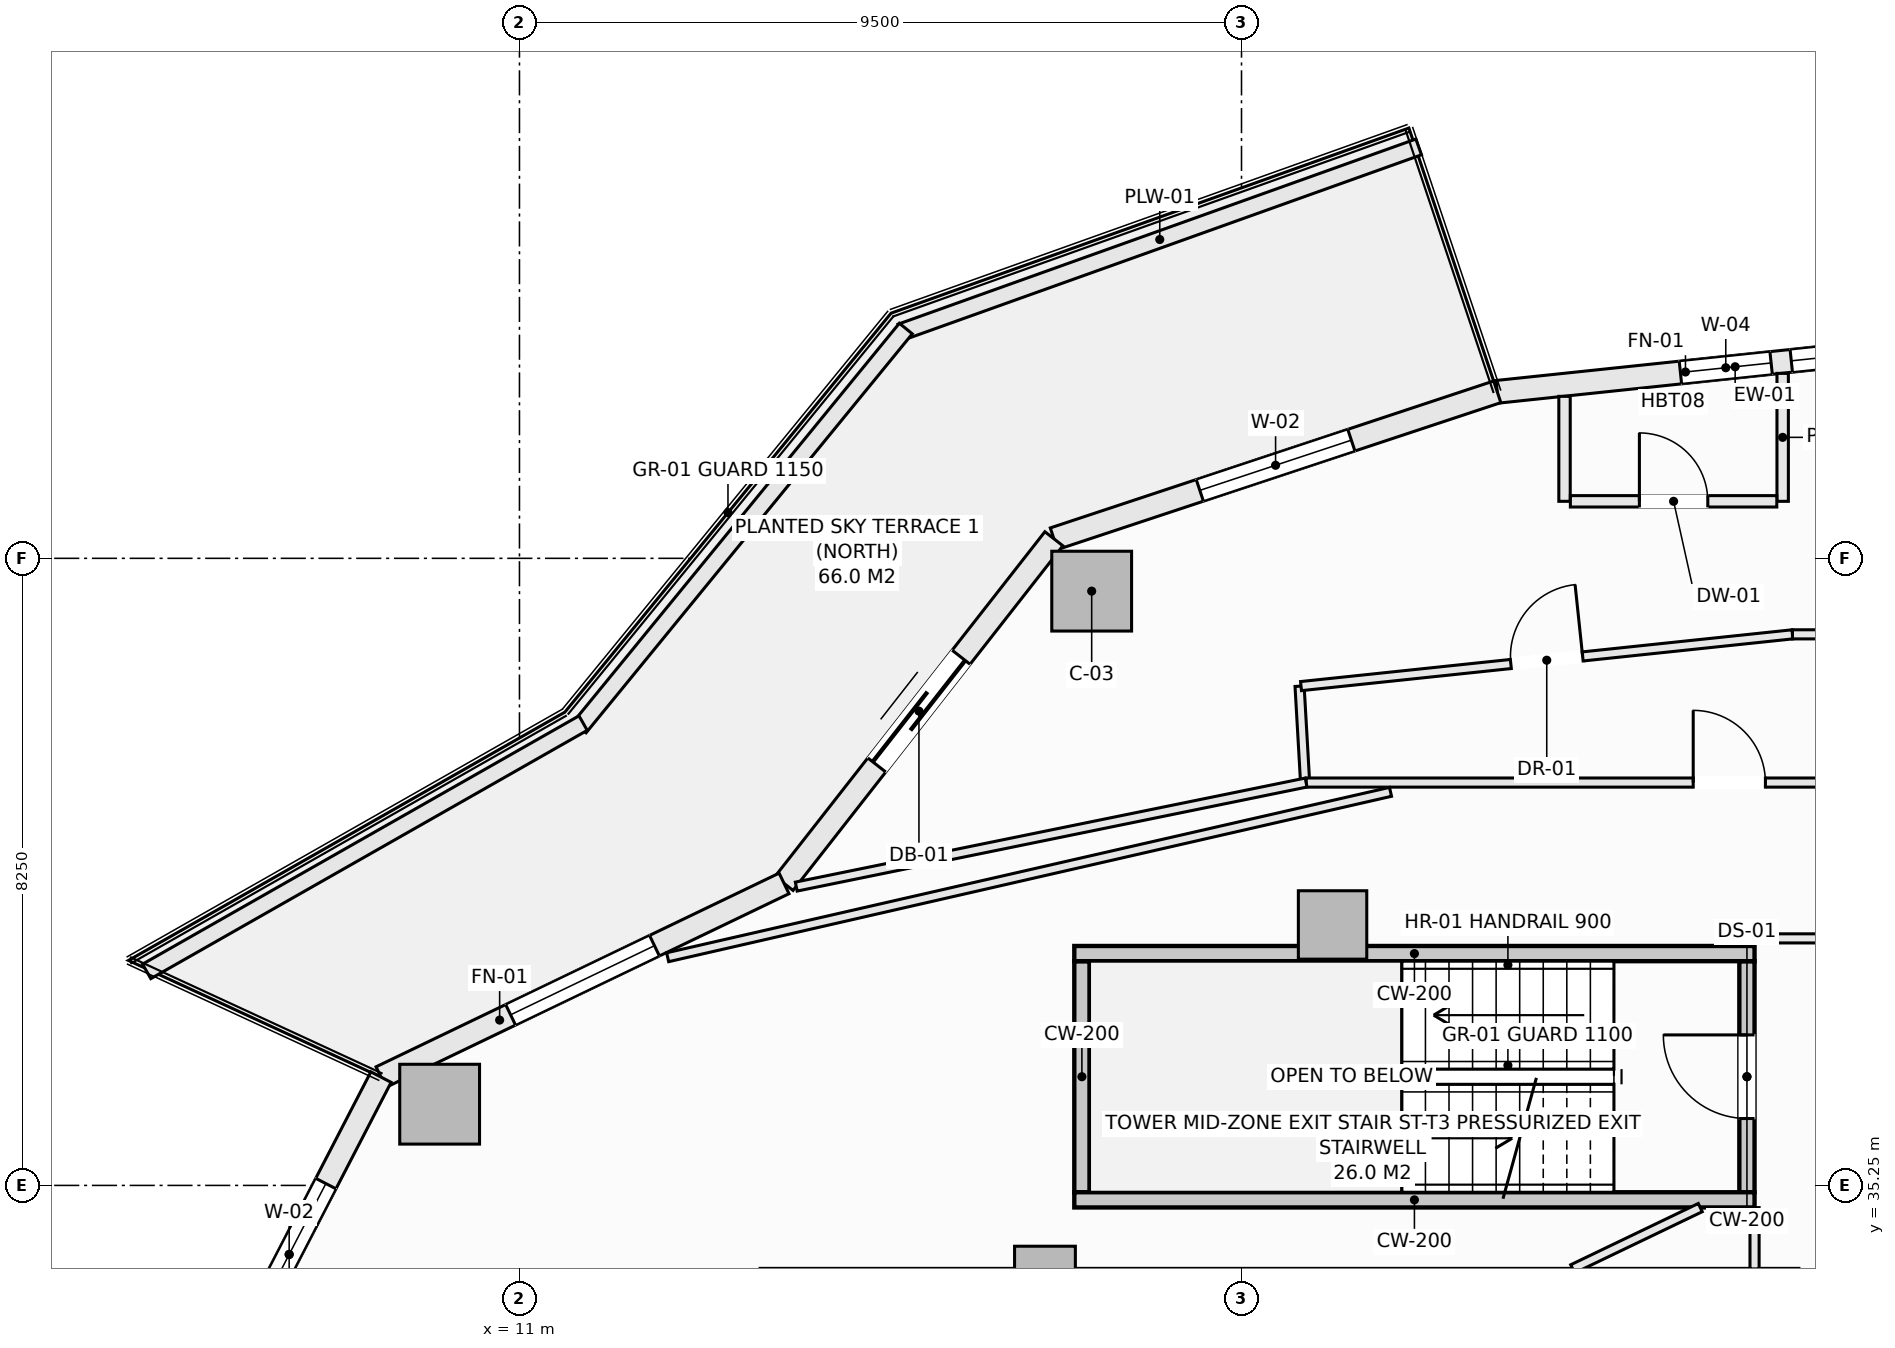
"""IFC4 building model, lengths in metres.
Left out: names, types, materials, properties, quantities, classifications, styles, units other than length and angle.
Written with IfcOpenShell. Run it as: python <this file> out.ifc"""

import sys

from ifc_helpers import new_model, si_unit, direction, frame, frame_2d, origin, origin_2d, place, context, subcontext, project, spatial, rectangle, extrude, element, fill, save


model = new_model("IFC4")
c1 = context("Model", 3, precision=1e-05, world=origin(), true_north=direction((0.0, 1.0)))
c2 = subcontext(c1, "Body", "Model", "MODEL_VIEW")
j1 = project(units=[si_unit("LENGTHUNIT", "METRE"), si_unit("PLANEANGLEUNIT", "RADIAN")], contexts=[c1])
p1 = place(None, origin())
s1 = spatial("IfcSite", under=j1, at=p1, CompositionType="ELEMENT")
p2 = place(p1, origin())
s2 = spatial("IfcBuilding", under=s1, at=p2, CompositionType="ELEMENT")
p3 = place(p2, frame((0.0, 0.0, 122.3)))
s3 = spatial("IfcBuildingStorey", under=s2, at=p3, CompositionType="ELEMENT", Elevation=122.3)
for number, where, z_axis, x_axis in (
    (1, (18.529, 43.068, -0.27), (0.0, 0.0, 1.0), (1.0, 0.0, 0.0)),
    (2, (9.95, 36.319, -0.27), (0.0, 0.0, 1.0), (1.0, 0.0, 0.0)),
):
    element("IfcColumn", number, at=place(p3, frame(where, z_axis=z_axis, x_axis=x_axis)), inside=s3, PredefinedType="COLUMN", context=c2, shape_type="SweptSolid", body=[
        extrude(rectangle(XDim=1.05, YDim=1.05, at=origin_2d()), origin(), (0.0, 0.0, 1.0), 3.4),
    ])
p4 = place(p3, frame((21.698, 38.677, -0.27), z_axis=(0.0, 0.0, 1.0), x_axis=(1.0, 0.0, 0.0)))
e3 = element("IfcColumn", 3, at=p4, inside=s3, PredefinedType="COLUMN", context=c2, shape_type="SweptSolid", body=[
    extrude(rectangle(XDim=0.9, YDim=0.9, at=origin_2d()), origin(), (0.0, 0.0, 1.0), 3.4),
])
p5 = place(p3, frame((17.914, 34.05, -0.27), z_axis=(0.0, 0.0, 1.0), x_axis=(1.0, 0.0, 0.0)))
e4 = element("IfcColumn", 4, at=p5, inside=s3, PredefinedType="PILASTER", context=c2, shape_type="SweptSolid", body=[
    extrude(rectangle(XDim=0.8, YDim=0.8, at=origin_2d()), origin(), (0.0, 0.0, 1.0), 3.4),
])
p6 = place(p3, frame((23.865, 45.691, 0.0), z_axis=(0.0, 0.0, 1.0), x_axis=(0.994498012394, 0.104755445421, 0.0)))
e5 = element("IfcWall", 5, at=p6, inside=s3, PredefinedType="SOLIDWALL", context=c2, shape_type="SweptSolid", body=[
    extrude(rectangle(XDim=6.295, YDim=0.3, at=frame_2d((3.147, 0.0))), origin(), (0.0, 0.0, 1.0), 2.653),
])
p7 = place(p6, frame((2.423, 0.0, 0.74)))
e6 = element("IfcOpeningElement", 6, at=p7, cuts=e5, PredefinedType="OPENING", context=c2, shape_type="SweptSolid", body=[
    extrude(rectangle(XDim=1.2, YDim=1.7, at=frame_2d((0.6, 0.85))), frame((0.0, 0.16, 0.0), z_axis=(0.0, -1.0, 0.0), x_axis=(1.0, 0.0, 0.0)), (0.0, 0.0, 1.0), 0.32),
])
p8 = place(p6, frame((3.89, 0.0, 0.74)))
e7 = element("IfcOpeningElement", 7, at=p8, cuts=e5, PredefinedType="OPENING", context=c2, shape_type="SweptSolid", body=[
    extrude(rectangle(XDim=1.2, YDim=1.7, at=frame_2d((0.6, 0.85))), frame((0.0, 0.16, 0.0), z_axis=(0.0, -1.0, 0.0), x_axis=(1.0, 0.0, 0.0)), (0.0, 0.0, 1.0), 0.32),
])
p9 = place(p3, frame((18.031, 43.758, 0.0), z_axis=(0.0, 0.0, 1.0), x_axis=(0.949238009374, 0.314558741032, 0.0)))
e8 = element("IfcWall", 8, at=p9, inside=s3, PredefinedType="SOLIDWALL", context=c2, shape_type="SweptSolid", body=[
    extrude(rectangle(XDim=6.146, YDim=0.3, at=frame_2d((3.073, 0.0))), origin(), (0.0, 0.0, 1.0), 2.653),
])
p10 = place(p9, frame((2.023, 0.0, 0.74)))
e9 = element("IfcOpeningElement", 9, at=p10, cuts=e8, PredefinedType="OPENING", context=c2, shape_type="SweptSolid", body=[
    extrude(rectangle(XDim=2.1, YDim=1.7, at=frame_2d((1.05, 0.85))), frame((0.0, 0.16, 0.0), z_axis=(0.0, -1.0, 0.0), x_axis=(1.0, 0.0, 0.0)), (0.0, 0.0, 1.0), 0.32),
])
p11 = place(p3, frame((14.481, 39.223, 0.0), z_axis=(0.0, 0.0, 1.0), x_axis=(0.616435134162, 0.787405693001, 0.0)))
e10 = element("IfcWall", 10, at=p11, inside=s3, PredefinedType="SOLIDWALL", context=c2, shape_type="SweptSolid", body=[
    extrude(rectangle(XDim=5.759, YDim=0.3, at=frame_2d((2.879, 0.0))), origin(), (0.0, 0.0, 1.0), 2.653),
])
p12 = place(p11, frame((1.979, 0.0, 0.0)))
e11 = element("IfcOpeningElement", 11, at=p12, cuts=e10, PredefinedType="OPENING", context=c2, shape_type="SweptSolid", body=[
    extrude(rectangle(XDim=1.8, YDim=2.25, at=frame_2d((0.9, 1.125))), frame((0.0, 0.16, 0.0), z_axis=(0.0, -1.0, 0.0), x_axis=(1.0, 0.0, 0.0)), (0.0, 0.0, 1.0), 0.32),
])
p13 = place(p3, frame((9.178, 36.675, 0.0), z_axis=(0.0, 0.0, 1.0), x_axis=(0.901370184739, 0.433049408339, 0.0)))
e12 = element("IfcWall", 12, at=p13, inside=s3, PredefinedType="SOLIDWALL", context=c2, shape_type="SweptSolid", body=[
    extrude(rectangle(XDim=5.884, YDim=0.3, at=frame_2d((2.942, 0.0))), origin(), (0.0, 0.0, 1.0), 2.653),
])
p14 = place(p13, frame((1.892, 0.0, 0.74)))
e13 = element("IfcOpeningElement", 13, at=p14, cuts=e12, PredefinedType="OPENING", context=c2, shape_type="SweptSolid", body=[
    extrude(rectangle(XDim=2.1, YDim=1.7, at=frame_2d((1.05, 0.85))), frame((0.0, 0.16, 0.0), z_axis=(0.0, -1.0, 0.0), x_axis=(1.0, 0.0, 0.0)), (0.0, 0.0, 1.0), 0.32),
])
p15 = place(p3, frame((6.762, 32.008, 0.0), z_axis=(0.0, 0.0, 1.0), x_axis=(0.459767899643, 0.888039119892, 0.0)))
e14 = element("IfcWall", 14, at=p15, inside=s3, PredefinedType="SOLIDWALL", context=c2, shape_type="SweptSolid", body=[
    extrude(rectangle(XDim=5.255, YDim=0.3, at=frame_2d((2.628, 0.0))), origin(), (0.0, 0.0, 1.0), 2.653),
])
p16 = place(p15, frame((1.578, 0.0, 0.74)))
e15 = element("IfcOpeningElement", 15, at=p16, cuts=e14, PredefinedType="OPENING", context=c2, shape_type="SweptSolid", body=[
    extrude(rectangle(XDim=2.1, YDim=1.7, at=frame_2d((1.05, 0.85))), frame((0.0, 0.16, 0.0), z_axis=(0.0, -1.0, 0.0), x_axis=(1.0, 0.0, 0.0)), (0.0, 0.0, 1.0), 0.32),
])
p17 = place(p3, frame((16.018, 46.477, 0.0), z_axis=(0.0, 0.0, 1.0), x_axis=(0.941628873241, 0.336652736627, 0.0)))
e16 = element("IfcWall", 16, at=p17, inside=s3, PredefinedType="PARAPET", context=c2, shape_type="SweptSolid", body=[
    extrude(rectangle(XDim=7.235, YDim=0.22, at=frame_2d((3.618, 0.0))), origin(), (0.0, 0.0, 1.0), 0.52),
])
p18 = place(p3, frame((11.791, 41.274, 0.0), z_axis=(0.0, 0.0, 1.0), x_axis=(0.633024046468, 0.774132131224, 0.0)))
e17 = element("IfcWall", 17, at=p18, inside=s3, PredefinedType="PARAPET", context=c2, shape_type="SweptSolid", body=[
    extrude(rectangle(XDim=6.781, YDim=0.22, at=frame_2d((3.39, 0.0))), origin(), (0.0, 0.0, 1.0), 0.52),
])
p19 = place(p3, frame((6.095, 38.066, 0.0), z_axis=(0.0, 0.0, 1.0), x_axis=(0.869187658335, 0.494482370361, 0.0)))
e18 = element("IfcWall", 18, at=p19, inside=s3, PredefinedType="PARAPET", context=c2, shape_type="SweptSolid", body=[
    extrude(rectangle(XDim=6.606, YDim=0.22, at=frame_2d((3.303, 0.0))), origin(), (0.0, 0.0, 1.0), 0.52),
])
p20 = place(p3, frame((27.15, 35.16, -0.27), z_axis=(0.0, 0.0, 1.0), x_axis=(0.0, 1.0, 0.0)))
e19 = element("IfcWall", 19, at=p20, inside=s3, PredefinedType="SHEAR", context=c2, shape_type="SweptSolid", body=[
    extrude(rectangle(XDim=3.04, YDim=0.2, at=frame_2d((1.52, 0.0))), origin(), (0.0, 0.0, 1.0), 3.4),
])
p21 = place(p20, frame((0.97, 0.0, 0.27)))
e20 = element("IfcOpeningElement", 20, at=p21, cuts=e19, PredefinedType="OPENING", context=c2, shape_type="SweptSolid", body=[
    extrude(rectangle(XDim=1.1, YDim=2.15, at=frame_2d((0.55, 1.075))), frame((0.0, 0.11, 0.0), z_axis=(0.0, -1.0, 0.0), x_axis=(1.0, 0.0, 0.0)), (0.0, 0.0, 1.0), 0.22),
])
p22 = place(p3, frame((18.4, 35.16, -0.27), z_axis=(0.0, 0.0, 1.0), x_axis=(0.0, 1.0, 0.0)))
e21 = element("IfcWall", 21, at=p22, inside=s3, PredefinedType="SHEAR", context=c2, shape_type="SweptSolid", body=[
    extrude(rectangle(XDim=3.04, YDim=0.2, at=frame_2d((1.52, 0.0))), origin(), (0.0, 0.0, 1.0), 3.4),
])
for number, where, z_axis, x_axis in (
    (22, (18.3, 38.3, -0.27), (0.0, 0.0, 1.0), (1.0, 0.0, 0.0)),
    (23, (18.3, 35.06, -0.27), (0.0, 0.0, 1.0), (1.0, 0.0, 0.0)),
):
    element("IfcWall", number, at=place(p3, frame(where, z_axis=z_axis, x_axis=x_axis)), inside=s3, PredefinedType="SHEAR", context=c2, shape_type="SweptSolid", body=[
        extrude(rectangle(XDim=8.95, YDim=0.2, at=frame_2d((4.475, 0.0))), origin(), (0.0, 0.0, 1.0), 3.4),
    ])
p23 = place(p3, frame((27.62, 44.25, 0.0), z_axis=(0.0, 0.0, 1.0), x_axis=(0.0, 1.0, 0.0)))
e24 = element("IfcWall", 24, at=p23, inside=s3, PredefinedType="PARTITIONING", context=c2, shape_type="SweptSolid", body=[
    extrude(rectangle(XDim=1.683, YDim=0.15, at=frame_2d((0.842, 0.0))), origin(), (0.0, 0.0, 1.0), 3.13),
])
p24 = place(p3, frame((21.264, 41.818, 0.0), z_axis=(0.0, 0.0, 1.0), x_axis=(0.0574492264, -0.99834842935, 0.0)))
e25 = element("IfcWall", 25, at=p24, inside=s3, PredefinedType="PARTITIONING", context=c2, shape_type="SweptSolid", body=[
    extrude(rectangle(XDim=1.271, YDim=0.12, at=frame_2d((0.635, 0.0))), origin(), (0.0, 0.0, 1.0), 3.13),
])
p25 = place(p3, frame((27.25, 34.152, 0.0), z_axis=(0.0, 0.0, 1.0), x_axis=(0.0, 1.0, 0.0)))
e26 = element("IfcWall", 26, at=p25, inside=s3, PredefinedType="PARTITIONING", context=c2, shape_type="SweptSolid", body=[
    extrude(rectangle(XDim=0.806, YDim=0.12, at=frame_2d((0.403, 0.0))), origin(), (0.0, 0.0, 1.0), 3.13),
])
p26 = place(p3, frame((27.25, 38.5, 0.0), z_axis=(0.0, 0.0, 1.0), x_axis=(1.0, 0.0, 0.0)))
e27 = element("IfcWall", 27, at=p26, inside=s3, PredefinedType="PARTITIONING", context=c2, shape_type="SweptSolid", body=[
    extrude(rectangle(XDim=2.53, YDim=0.12, at=frame_2d((1.265, 0.0))), origin(), (0.0, 0.0, 1.0), 3.13),
])
p27 = place(p3, frame((21.351, 40.55, 0.0), z_axis=(0.0, 0.0, 1.0), x_axis=(1.0, 0.0, 0.0)))
e28 = element("IfcWall", 28, at=p27, inside=s3, PredefinedType="PARTITIONING", context=c2, shape_type="SweptSolid", body=[
    extrude(rectangle(XDim=10.737, YDim=0.12, at=frame_2d((5.369, 0.0))), origin(), (0.0, 0.0, 1.0), 3.13),
])
p28 = place(p27, frame((5.092, 0.0, 0.0)))
e29 = element("IfcOpeningElement", 29, at=p28, cuts=e28, PredefinedType="OPENING", context=c2, shape_type="SweptSolid", body=[
    extrude(rectangle(XDim=0.95, YDim=2.1, at=frame_2d((0.475, 1.05))), frame((0.0, 0.07, 0.0), z_axis=(0.0, -1.0, 0.0), x_axis=(1.0, 0.0, 0.0)), (0.0, 0.0, 1.0), 0.14),
])
p29 = place(p3, frame((21.283, 41.819, 0.0), z_axis=(0.0, 0.0, 1.0), x_axis=(0.994501131299, 0.104725831799, 0.0)))
e30 = element("IfcWall", 30, at=p29, inside=s3, PredefinedType="PARTITIONING", context=c2, shape_type="SweptSolid", body=[
    extrude(rectangle(XDim=6.502, YDim=0.12, at=frame_2d((3.251, 0.0))), origin(), (0.0, 0.0, 1.0), 3.13),
])
p30 = place(p29, frame((2.776, 0.0, 0.0)))
e31 = element("IfcOpeningElement", 31, at=p30, cuts=e30, PredefinedType="OPENING", context=c2, shape_type="SweptSolid", body=[
    extrude(rectangle(XDim=0.95, YDim=2.1, at=frame_2d((0.475, 1.05))), frame((0.0, 0.07, 0.0), z_axis=(0.0, -1.0, 0.0), x_axis=(1.0, 0.0, 0.0)), (0.0, 0.0, 1.0), 0.14),
])
p31 = place(p3, frame((27.749, 42.5, 0.0), z_axis=(0.0, 0.0, 1.0), x_axis=(1.0, 0.0, 0.0)))
e32 = element("IfcWall", 32, at=p31, inside=s3, PredefinedType="PARTITIONING", context=c2, shape_type="SweptSolid", body=[
    extrude(rectangle(XDim=4.752, YDim=0.12, at=frame_2d((2.376, 0.0))), origin(), (0.0, 0.0, 1.0), 3.13),
])
p32 = place(p3, frame((24.857, 34.152, 0.0), z_axis=(0.0, 0.0, 1.0), x_axis=(0.901471897781, 0.43283763412, 0.0)))
e33 = element("IfcWall", 33, at=p32, inside=s3, PredefinedType="PARTITIONING", context=c2, shape_type="SweptSolid", body=[
    extrude(rectangle(XDim=1.862, YDim=0.12, at=frame_2d((0.931, 0.0))), origin(), (0.0, 0.0, 1.0), 3.13),
])
p33 = place(p3, frame((24.75, 44.25, 0.0), z_axis=(0.0, 0.0, 1.0), x_axis=(0.0, 1.0, 0.0)))
e34 = element("IfcWall", 34, at=p33, inside=s3, PredefinedType="PARTITIONING", context=c2, shape_type="SweptSolid", body=[
    extrude(rectangle(XDim=1.381, YDim=0.15, at=frame_2d((0.69, 0.0))), origin(), (0.0, 0.0, 1.0), 3.13),
])
p34 = place(p3, frame((24.827, 44.25, 0.0), z_axis=(0.0, 0.0, 1.0), x_axis=(1.0, 0.0, 0.0)))
e35 = element("IfcWall", 35, at=p34, inside=s3, PredefinedType="PARTITIONING", context=c2, shape_type="SweptSolid", body=[
    extrude(rectangle(XDim=2.716, YDim=0.15, at=frame_2d((1.358, 0.0))), origin(), (0.0, 0.0, 1.0), 2.653),
])
p35 = place(p34, frame((0.908, 0.0, 0.0)))
e36 = element("IfcOpeningElement", 36, at=p35, cuts=e35, PredefinedType="OPENING", context=c2, shape_type="SweptSolid", body=[
    extrude(rectangle(XDim=0.9, YDim=2.1, at=frame_2d((0.45, 1.05))), frame((0.0, 0.085, 0.0), z_axis=(0.0, -1.0, 0.0), x_axis=(1.0, 0.0, 0.0)), (0.0, 0.0, 1.0), 0.17),
])
p36 = place(p3, frame((12.95, 38.252, 0.0), z_axis=(0.0, 0.0, 1.0), x_axis=(0.974810805883, 0.223033389281, 0.0)))
e37 = element("IfcWall", 37, at=p36, inside=s3, PredefinedType="PARTITIONING", context=c2, shape_type="SweptSolid", body=[
    extrude(rectangle(XDim=9.757, YDim=0.12, at=frame_2d((4.878, 0.0))), origin(), (0.0, 0.0, 1.0), 3.13),
])
p37 = place(p3, frame((14.642, 39.181, 0.0), z_axis=(0.0, 0.0, 1.0), x_axis=(0.979813468357, 0.199913899534, 0.0)))
e38 = element("IfcWall", 38, at=p37, inside=s3, PredefinedType="PARTITIONING", context=c2, shape_type="SweptSolid", body=[
    extrude(rectangle(XDim=6.846, YDim=0.12, at=frame_2d((3.423, 0.0))), origin(), (0.0, 0.0, 1.0), 3.13),
])
p38 = place(p7, origin())
e39 = element("IfcWindow", 39, at=p38, inside=s3, PartitioningType="SINGLE_PANEL", PredefinedType="WINDOW", context=c2, shape_type="SweptSolid", body=[
    extrude(rectangle(XDim=1.2, YDim=1.7, at=frame_2d((0.6, 0.85))), frame((0.0, 0.03, 0.0), z_axis=(0.0, -1.0, 0.0), x_axis=(1.0, 0.0, 0.0)), (0.0, 0.0, 1.0), 0.06),
])
fill(e6, e39)
p39 = place(p10, origin())
e40 = element("IfcWindow", 40, at=p39, inside=s3, PartitioningType="SINGLE_PANEL", PredefinedType="WINDOW", context=c2, shape_type="SweptSolid", body=[
    extrude(rectangle(XDim=2.1, YDim=1.7, at=frame_2d((1.05, 0.85))), frame((0.0, 0.03, 0.0), z_axis=(0.0, -1.0, 0.0), x_axis=(1.0, 0.0, 0.0)), (0.0, 0.0, 1.0), 0.06),
])
fill(e9, e40)
p40 = place(p12, origin())
e41 = element("IfcDoor", 41, at=p40, inside=s3, OperationType="SLIDING_TO_LEFT", PredefinedType="DOOR", context=c2, shape_type="SweptSolid", body=[
    extrude(rectangle(XDim=1.8, YDim=2.25, at=frame_2d((0.9, 1.125))), frame((0.0, 0.025, 0.0), z_axis=(0.0, -1.0, 0.0), x_axis=(1.0, 0.0, 0.0)), (0.0, 0.0, 1.0), 0.05),
])
fill(e11, e41)
p41 = place(p14, origin())
e42 = element("IfcWindow", 42, at=p41, inside=s3, PartitioningType="SINGLE_PANEL", PredefinedType="WINDOW", context=c2, shape_type="SweptSolid", body=[
    extrude(rectangle(XDim=2.1, YDim=1.7, at=frame_2d((1.05, 0.85))), frame((0.0, 0.03, 0.0), z_axis=(0.0, -1.0, 0.0), x_axis=(1.0, 0.0, 0.0)), (0.0, 0.0, 1.0), 0.06),
])
fill(e13, e42)
p42 = place(p16, origin())
e43 = element("IfcWindow", 43, at=p42, inside=s3, PartitioningType="SINGLE_PANEL", PredefinedType="WINDOW", context=c2, shape_type="SweptSolid", body=[
    extrude(rectangle(XDim=2.1, YDim=1.7, at=frame_2d((1.05, 0.85))), frame((0.0, 0.03, 0.0), z_axis=(0.0, -1.0, 0.0), x_axis=(1.0, 0.0, 0.0)), (0.0, 0.0, 1.0), 0.06),
])
fill(e15, e43)
p43 = place(p21, origin())
e44 = element("IfcDoor", 44, at=p43, inside=s3, OperationType="SINGLE_SWING_RIGHT", PredefinedType="DOOR", context=c2, shape_type="SweptSolid", body=[
    extrude(rectangle(XDim=1.1, YDim=2.15, at=frame_2d((0.55, 1.075))), frame((0.0, 0.025, 0.0), z_axis=(0.0, -1.0, 0.0), x_axis=(1.0, 0.0, 0.0)), (0.0, 0.0, 1.0), 0.05),
])
fill(e20, e44)
p44 = place(p30, origin())
e45 = element("IfcDoor", 45, at=p44, inside=s3, OperationType="SINGLE_SWING_RIGHT", PredefinedType="DOOR", context=c2, shape_type="SweptSolid", body=[
    extrude(rectangle(XDim=0.95, YDim=2.1, at=frame_2d((0.475, 1.05))), frame((0.0, 0.025, 0.0), z_axis=(0.0, -1.0, 0.0), x_axis=(1.0, 0.0, 0.0)), (0.0, 0.0, 1.0), 0.05),
])
fill(e31, e45)
p45 = place(p28, origin())
e46 = element("IfcDoor", 46, at=p45, inside=s3, OperationType="SINGLE_SWING_LEFT", PredefinedType="DOOR", context=c2, shape_type="SweptSolid", body=[
    extrude(rectangle(XDim=0.95, YDim=2.1, at=frame_2d((0.475, 1.05))), frame((0.0, 0.025, 0.0), z_axis=(0.0, -1.0, 0.0), x_axis=(1.0, 0.0, 0.0)), (0.0, 0.0, 1.0), 0.05),
])
fill(e29, e46)
p46 = place(p35, origin())
e47 = element("IfcDoor", 47, at=p46, inside=s3, OperationType="SINGLE_SWING_LEFT", PredefinedType="DOOR", context=c2, shape_type="SweptSolid", body=[
    extrude(rectangle(XDim=0.9, YDim=2.1, at=frame_2d((0.45, 1.05))), frame((0.0, 0.025, 0.0), z_axis=(0.0, -1.0, 0.0), x_axis=(1.0, 0.0, 0.0)), (0.0, 0.0, 1.0), 0.05),
])
fill(e36, e47)
p47 = place(p8, origin())
e48 = element("IfcWindow", 48, at=p47, inside=s3, PartitioningType="SINGLE_PANEL", PredefinedType="WINDOW", context=c2, shape_type="SweptSolid", body=[
    extrude(rectangle(XDim=1.2, YDim=1.7, at=frame_2d((0.6, 0.85))), frame((0.0, 0.03, 0.0), z_axis=(0.0, -1.0, 0.0), x_axis=(1.0, 0.0, 0.0)), (0.0, 0.0, 1.0), 0.06),
])
fill(e7, e48)
save(model, sys.argv[1])
